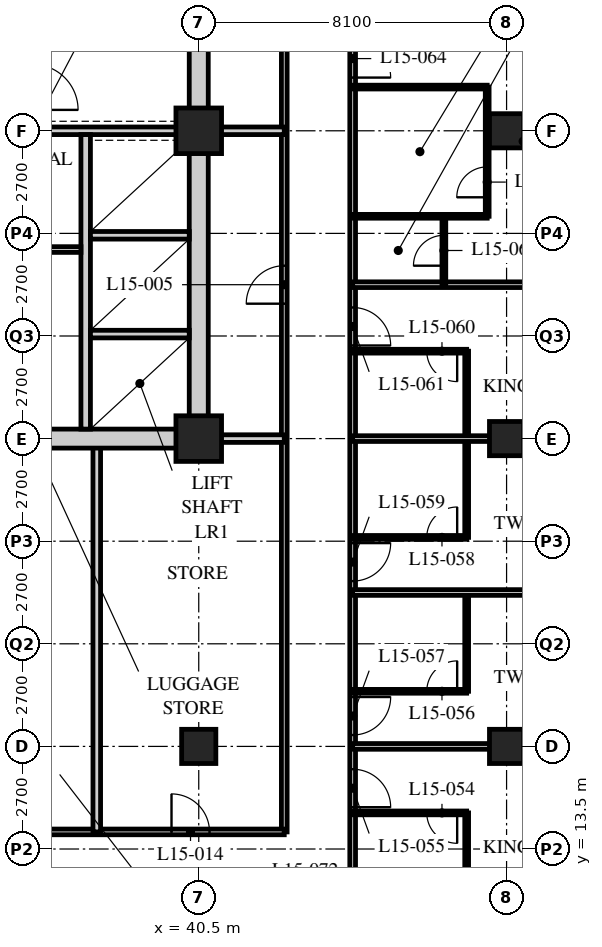
"""IFC4 building model, lengths in metres.
Left out: names, types, materials, properties, quantities, classifications, styles, units other than length and angle.
Written with IfcOpenShell. Run it as: python <this file> out.ifc"""

import sys

from ifc_helpers import new_model, si_unit, direction, frame, frame_2d, origin, origin_2d, place, context, subcontext, project, spatial, rectangle, hollow_rectangle, extrude, element, fill, save


model = new_model("IFC4")
c1 = context("Model", 3, precision=1e-05, world=origin(), true_north=direction((0.0, 1.0)))
c2 = subcontext(c1, "Body", "Model", "MODEL_VIEW")
j1 = project(units=[si_unit("LENGTHUNIT", "METRE"), si_unit("PLANEANGLEUNIT", "RADIAN")], contexts=[c1])
p1 = place(None, origin())
s1 = spatial("IfcSite", under=j1, at=p1, CompositionType="ELEMENT")
p2 = place(p1, origin())
s2 = spatial("IfcBuilding", under=s1, at=p2, CompositionType="ELEMENT")
p3 = place(p2, frame((0.0, 0.0, 63.6)))
s3 = spatial("IfcBuildingStorey", under=s2, at=p3, CompositionType="ELEMENT", Elevation=63.6)
p4 = place(p3, frame((40.5, 16.2, 0.0), z_axis=(0.0, 0.0, 1.0), x_axis=(1.0, 0.0, 0.0)))
e1 = element("IfcColumn", 1, at=p4, inside=s3, PredefinedType="COLUMN", context=c2, shape_type="SweptSolid", body=[
    extrude(hollow_rectangle(XDim=0.9, YDim=0.9, WallThickness=0.09, at=origin_2d()), origin(), (0.0, 0.0, 1.0), 3.4),
])
for number, where, z_axis, x_axis in (
    (2, (40.5, 24.3, 0.0), (0.0, 0.0, 1.0), (1.0, 0.0, 0.0)),
    (3, (40.5, 32.4, 0.0), (0.0, 0.0, 1.0), (1.0, 0.0, 0.0)),
):
    element("IfcColumn", number, at=place(p3, frame(where, z_axis=z_axis, x_axis=x_axis)), inside=s3, PredefinedType="COLUMN", context=c2, shape_type="SweptSolid", body=[
        extrude(hollow_rectangle(XDim=1.2, YDim=1.2, WallThickness=0.12, at=origin_2d()), origin(), (0.0, 0.0, 1.0), 3.4),
    ])
for number, where, z_axis, x_axis in (
    (4, (48.6, 16.2, 0.0), (0.0, 0.0, 1.0), (1.0, 0.0, 0.0)),
    (5, (48.6, 24.3, 0.0), (0.0, 0.0, 1.0), (1.0, 0.0, 0.0)),
    (6, (48.6, 32.4, 0.0), (0.0, 0.0, 1.0), (1.0, 0.0, 0.0)),
):
    element("IfcColumn", number, at=place(p3, frame(where, z_axis=z_axis, x_axis=x_axis)), inside=s3, PredefinedType="COLUMN", context=c2, shape_type="SweptSolid", body=[
        extrude(hollow_rectangle(XDim=0.9, YDim=0.9, WallThickness=0.09, at=origin_2d()), origin(), (0.0, 0.0, 1.0), 3.4),
    ])
p5 = place(p3, frame((44.55, 12.15, 0.0), z_axis=(0.0, 0.0, 1.0), x_axis=(0.0, 1.0, 0.0)))
e7 = element("IfcWall", 7, at=p5, inside=s3, PredefinedType="PARTITIONING", context=c2, shape_type="SweptSolid", body=[
    extrude(rectangle(XDim=30.15, YDim=0.15, at=frame_2d((15.075, 0.0))), origin(), (0.0, 0.0, 1.0), 3.19),
])
p6 = place(p5, frame((2.45, 0.0, 0.0)))
e8 = element("IfcOpeningElement", 8, at=p6, cuts=e7, PredefinedType="OPENING", context=c2, shape_type="SweptSolid", body=[
    extrude(rectangle(XDim=1.0, YDim=2.1, at=frame_2d((0.5, 1.05))), frame((0.0, 0.085, 0.0), z_axis=(0.0, -1.0, 0.0), x_axis=(1.0, 0.0, 0.0)), (0.0, 0.0, 1.0), 0.17),
])
p7 = place(p5, frame((4.35, 0.0, 0.0)))
e9 = element("IfcOpeningElement", 9, at=p7, cuts=e7, PredefinedType="OPENING", context=c2, shape_type="SweptSolid", body=[
    extrude(rectangle(XDim=1.0, YDim=2.1, at=frame_2d((0.5, 1.05))), frame((0.0, 0.085, 0.0), z_axis=(0.0, -1.0, 0.0), x_axis=(1.0, 0.0, 0.0)), (0.0, 0.0, 1.0), 0.17),
])
p8 = place(p5, frame((8.4, 0.0, 0.0)))
e10 = element("IfcOpeningElement", 10, at=p8, cuts=e7, PredefinedType="OPENING", context=c2, shape_type="SweptSolid", body=[
    extrude(rectangle(XDim=1.0, YDim=2.1, at=frame_2d((0.5, 1.05))), frame((0.0, 0.085, 0.0), z_axis=(0.0, -1.0, 0.0), x_axis=(1.0, 0.0, 0.0)), (0.0, 0.0, 1.0), 0.17),
])
p9 = place(p5, frame((14.6, 0.0, 0.0)))
e11 = element("IfcOpeningElement", 11, at=p9, cuts=e7, PredefinedType="OPENING", context=c2, shape_type="SweptSolid", body=[
    extrude(rectangle(XDim=1.0, YDim=2.1, at=frame_2d((0.5, 1.05))), frame((0.0, 0.085, 0.0), z_axis=(0.0, -1.0, 0.0), x_axis=(1.0, 0.0, 0.0)), (0.0, 0.0, 1.0), 0.17),
])
p10 = place(p5, frame((21.65, 0.0, 0.0)))
e12 = element("IfcOpeningElement", 12, at=p10, cuts=e7, PredefinedType="OPENING", context=c2, shape_type="SweptSolid", body=[
    extrude(rectangle(XDim=1.0, YDim=2.1, at=frame_2d((0.5, 1.05))), frame((0.0, 0.085, 0.0), z_axis=(0.0, -1.0, 0.0), x_axis=(1.0, 0.0, 0.0)), (0.0, 0.0, 1.0), 0.17),
])
p11 = place(p5, frame((26.7, 0.0, 0.0)))
e13 = element("IfcOpeningElement", 13, at=p11, cuts=e7, PredefinedType="OPENING", context=c2, shape_type="SweptSolid", body=[
    extrude(rectangle(XDim=1.0, YDim=2.1, at=frame_2d((0.5, 1.05))), frame((0.0, 0.085, 0.0), z_axis=(0.0, -1.0, 0.0), x_axis=(1.0, 0.0, 0.0)), (0.0, 0.0, 1.0), 0.17),
])
p12 = place(p3, frame((42.75, 13.95, 0.0), z_axis=(0.0, 0.0, 1.0), x_axis=(0.0, 1.0, 0.0)))
e14 = element("IfcWall", 14, at=p12, inside=s3, PredefinedType="PARTITIONING", context=c2, shape_type="SweptSolid", body=[
    extrude(rectangle(XDim=26.55, YDim=0.15, at=frame_2d((13.275, 0.0))), origin(), (0.0, 0.0, 1.0), 3.19),
])
p13 = place(p12, frame((13.9, 0.0, 0.0)))
e15 = element("IfcOpeningElement", 15, at=p13, cuts=e14, PredefinedType="OPENING", context=c2, shape_type="SweptSolid", body=[
    extrude(rectangle(XDim=1.0, YDim=2.1, at=frame_2d((0.5, 1.05))), frame((0.0, 0.085, 0.0), z_axis=(0.0, -1.0, 0.0), x_axis=(1.0, 0.0, 0.0)), (0.0, 0.0, 1.0), 0.17),
])
p14 = place(p12, frame((22.0, 0.0, 0.0)))
e16 = element("IfcOpeningElement", 16, at=p14, cuts=e14, PredefinedType="OPENING", context=c2, shape_type="SweptSolid", body=[
    extrude(rectangle(XDim=1.0, YDim=2.1, at=frame_2d((0.5, 1.05))), frame((0.0, 0.085, 0.0), z_axis=(0.0, -1.0, 0.0), x_axis=(1.0, 0.0, 0.0)), (0.0, 0.0, 1.0), 0.17),
])
p15 = place(p3, frame((29.56, 13.95, 0.0), z_axis=(0.0, 0.0, 1.0), x_axis=(1.0, 0.0, 0.0)))
e17 = element("IfcWall", 17, at=p15, inside=s3, PredefinedType="PARTITIONING", context=c2, shape_type="SweptSolid", body=[
    extrude(rectangle(XDim=13.19, YDim=0.15, at=frame_2d((6.595, 0.0))), origin(), (0.0, 0.0, 1.0), 3.19),
])
p16 = place(p15, frame((1.157, 0.0, 0.0)))
e18 = element("IfcOpeningElement", 18, at=p16, cuts=e17, PredefinedType="OPENING", context=c2, shape_type="SweptSolid", body=[
    extrude(rectangle(XDim=1.0, YDim=2.1, at=frame_2d((0.5, 1.05))), frame((0.0, 0.085, 0.0), z_axis=(0.0, -1.0, 0.0), x_axis=(1.0, 0.0, 0.0)), (0.0, 0.0, 1.0), 0.17),
])
p17 = place(p15, frame((5.29, 0.0, 0.0)))
e19 = element("IfcOpeningElement", 19, at=p17, cuts=e17, PredefinedType="OPENING", context=c2, shape_type="SweptSolid", body=[
    extrude(rectangle(XDim=1.0, YDim=2.1, at=frame_2d((0.5, 1.05))), frame((0.0, 0.085, 0.0), z_axis=(0.0, -1.0, 0.0), x_axis=(1.0, 0.0, 0.0)), (0.0, 0.0, 1.0), 0.17),
])
p18 = place(p15, frame((10.223, 0.0, 0.0)))
e20 = element("IfcOpeningElement", 20, at=p18, cuts=e17, PredefinedType="OPENING", context=c2, shape_type="SweptSolid", body=[
    extrude(rectangle(XDim=1.0, YDim=2.1, at=frame_2d((0.5, 1.05))), frame((0.0, 0.085, 0.0), z_axis=(0.0, -1.0, 0.0), x_axis=(1.0, 0.0, 0.0)), (0.0, 0.0, 1.0), 0.17),
])
p19 = place(p3, frame((40.5, 32.4, 0.0), z_axis=(0.0, 0.0, 1.0), x_axis=(1.0, 0.0, 0.0)))
e21 = element("IfcWall", 21, at=p19, inside=s3, PredefinedType="SOLIDWALL", context=c2, shape_type="SweptSolid", body=[
    extrude(rectangle(XDim=2.25, YDim=0.2, at=frame_2d((1.125, 0.0))), origin(), (0.0, 0.0, 1.0), 2.578),
])
p20 = place(p3, frame((37.817, 13.95, 0.0), z_axis=(0.0, 0.0, 1.0), x_axis=(0.0, 1.0, 0.0)))
e22 = element("IfcWall", 22, at=p20, inside=s3, PredefinedType="SOLIDWALL", context=c2, shape_type="SweptSolid", body=[
    extrude(rectangle(XDim=10.35, YDim=0.2, at=frame_2d((5.175, 0.0))), origin(), (0.0, 0.0, 1.0), 3.19),
])
p21 = place(p3, frame((40.5, 24.3, 0.0), z_axis=(0.0, 0.0, 1.0), x_axis=(1.0, 0.0, 0.0)))
e23 = element("IfcWall", 23, at=p21, inside=s3, PredefinedType="SOLIDWALL", context=c2, shape_type="SweptSolid", body=[
    extrude(rectangle(XDim=2.25, YDim=0.2, at=frame_2d((1.125, 0.0))), origin(), (0.0, 0.0, 1.0), 2.578),
])
p22 = place(p3, frame((47.55, 12.15, 0.0), z_axis=(0.0, 0.0, 1.0), x_axis=(0.0, 1.0, 0.0)))
e24 = element("IfcWall", 24, at=p22, inside=s3, PredefinedType="PARTITIONING", context=c2, shape_type="SweptSolid", body=[
    extrude(rectangle(XDim=2.3, YDim=0.1, at=frame_2d((1.15, 0.0))), origin(), (0.0, 0.0, 1.0), 3.19),
])
p23 = place(p3, frame((44.55, 14.45, 0.0), z_axis=(0.0, 0.0, 1.0), x_axis=(1.0, 0.0, 0.0)))
e25 = element("IfcWall", 25, at=p23, inside=s3, PredefinedType="PARTITIONING", context=c2, shape_type="SweptSolid", body=[
    extrude(rectangle(XDim=3.0, YDim=0.1, at=frame_2d((1.5, 0.0))), origin(), (0.0, 0.0, 1.0), 3.19),
])
p24 = place(p23, frame((1.95, 0.0, 0.0)))
e26 = element("IfcOpeningElement", 26, at=p24, cuts=e25, PredefinedType="OPENING", context=c2, shape_type="SweptSolid", body=[
    extrude(rectangle(XDim=0.8, YDim=2.1, at=frame_2d((0.4, 1.05))), frame((0.0, 0.06, 0.0), z_axis=(0.0, -1.0, 0.0), x_axis=(1.0, 0.0, 0.0)), (0.0, 0.0, 1.0), 0.12),
])
p25 = place(p3, frame((44.55, 16.2, 0.0), z_axis=(0.0, 0.0, 1.0), x_axis=(1.0, 0.0, 0.0)))
e27 = element("IfcWall", 27, at=p25, inside=s3, PredefinedType="PARTITIONING", context=c2, shape_type="SweptSolid", body=[
    extrude(rectangle(XDim=11.85, YDim=0.15, at=frame_2d((5.925, 0.0))), origin(), (0.0, 0.0, 1.0), 2.578),
])
p26 = place(p3, frame((47.55, 17.65, 0.0), z_axis=(0.0, 0.0, 1.0), x_axis=(0.0, 1.0, 0.0)))
e28 = element("IfcWall", 28, at=p26, inside=s3, PredefinedType="PARTITIONING", context=c2, shape_type="SweptSolid", body=[
    extrude(rectangle(XDim=2.6, YDim=0.1, at=frame_2d((1.3, 0.0))), origin(), (0.0, 0.0, 1.0), 3.19),
])
p27 = place(p3, frame((44.55, 17.65, 0.0), z_axis=(0.0, 0.0, 1.0), x_axis=(1.0, 0.0, 0.0)))
e29 = element("IfcWall", 29, at=p27, inside=s3, PredefinedType="PARTITIONING", context=c2, shape_type="SweptSolid", body=[
    extrude(rectangle(XDim=3.0, YDim=0.1, at=frame_2d((1.5, 0.0))), origin(), (0.0, 0.0, 1.0), 3.19),
])
p28 = place(p27, frame((1.95, 0.0, 0.0)))
e30 = element("IfcOpeningElement", 30, at=p28, cuts=e29, PredefinedType="OPENING", context=c2, shape_type="SweptSolid", body=[
    extrude(rectangle(XDim=0.8, YDim=2.1, at=frame_2d((0.4, 1.05))), frame((0.0, 0.06, 0.0), z_axis=(0.0, -1.0, 0.0), x_axis=(1.0, 0.0, 0.0)), (0.0, 0.0, 1.0), 0.12),
])
p29 = place(p3, frame((44.55, 20.25, 0.0), z_axis=(0.0, 0.0, 1.0), x_axis=(1.0, 0.0, 0.0)))
e31 = element("IfcWall", 31, at=p29, inside=s3, PredefinedType="PARTITIONING", context=c2, shape_type="SweptSolid", body=[
    extrude(rectangle(XDim=11.85, YDim=0.15, at=frame_2d((5.925, 0.0))), origin(), (0.0, 0.0, 1.0), 3.19),
])
p30 = place(p3, frame((47.55, 21.7, 0.0), z_axis=(0.0, 0.0, 1.0), x_axis=(0.0, 1.0, 0.0)))
e32 = element("IfcWall", 32, at=p30, inside=s3, PredefinedType="PARTITIONING", context=c2, shape_type="SweptSolid", body=[
    extrude(rectangle(XDim=4.9, YDim=0.1, at=frame_2d((2.45, 0.0))), origin(), (0.0, 0.0, 1.0), 3.19),
])
p31 = place(p3, frame((44.55, 21.7, 0.0), z_axis=(0.0, 0.0, 1.0), x_axis=(1.0, 0.0, 0.0)))
e33 = element("IfcWall", 33, at=p31, inside=s3, PredefinedType="PARTITIONING", context=c2, shape_type="SweptSolid", body=[
    extrude(rectangle(XDim=3.0, YDim=0.1, at=frame_2d((1.5, 0.0))), origin(), (0.0, 0.0, 1.0), 3.19),
])
p32 = place(p31, frame((1.95, 0.0, 0.0)))
e34 = element("IfcOpeningElement", 34, at=p32, cuts=e33, PredefinedType="OPENING", context=c2, shape_type="SweptSolid", body=[
    extrude(rectangle(XDim=0.8, YDim=2.1, at=frame_2d((0.4, 1.05))), frame((0.0, 0.06, 0.0), z_axis=(0.0, -1.0, 0.0), x_axis=(1.0, 0.0, 0.0)), (0.0, 0.0, 1.0), 0.12),
])
p33 = place(p3, frame((44.55, 24.3, 0.0), z_axis=(0.0, 0.0, 1.0), x_axis=(1.0, 0.0, 0.0)))
e35 = element("IfcWall", 35, at=p33, inside=s3, PredefinedType="PARTITIONING", context=c2, shape_type="SweptSolid", body=[
    extrude(rectangle(XDim=11.85, YDim=0.15, at=frame_2d((5.925, 0.0))), origin(), (0.0, 0.0, 1.0), 2.578),
])
p34 = place(p3, frame((44.55, 26.6, 0.0), z_axis=(0.0, 0.0, 1.0), x_axis=(1.0, 0.0, 0.0)))
e36 = element("IfcWall", 36, at=p34, inside=s3, PredefinedType="PARTITIONING", context=c2, shape_type="SweptSolid", body=[
    extrude(rectangle(XDim=3.0, YDim=0.1, at=frame_2d((1.5, 0.0))), origin(), (0.0, 0.0, 1.0), 3.19),
])
p35 = place(p34, frame((1.95, 0.0, 0.0)))
e37 = element("IfcOpeningElement", 37, at=p35, cuts=e36, PredefinedType="OPENING", context=c2, shape_type="SweptSolid", body=[
    extrude(rectangle(XDim=0.8, YDim=2.1, at=frame_2d((0.4, 1.05))), frame((0.0, 0.06, 0.0), z_axis=(0.0, -1.0, 0.0), x_axis=(1.0, 0.0, 0.0)), (0.0, 0.0, 1.0), 0.12),
])
p36 = place(p3, frame((44.55, 28.35, 0.0), z_axis=(0.0, 0.0, 1.0), x_axis=(1.0, 0.0, 0.0)))
e38 = element("IfcWall", 38, at=p36, inside=s3, PredefinedType="PARTITIONING", context=c2, shape_type="SweptSolid", body=[
    extrude(rectangle(XDim=11.85, YDim=0.15, at=frame_2d((5.925, 0.0))), origin(), (0.0, 0.0, 1.0), 3.19),
])
p37 = place(p3, frame((48.09, 30.15, 0.0), z_axis=(0.0, 0.0, 1.0), x_axis=(0.0, 1.0, 0.0)))
e39 = element("IfcWall", 39, at=p37, inside=s3, PredefinedType="PARTITIONING", context=c2, shape_type="SweptSolid", body=[
    extrude(rectangle(XDim=3.4, YDim=0.1, at=frame_2d((1.7, 0.0))), origin(), (0.0, 0.0, 1.0), 3.19),
])
p38 = place(p37, frame((0.5, 0.0, 0.0)))
e40 = element("IfcOpeningElement", 40, at=p38, cuts=e39, PredefinedType="OPENING", context=c2, shape_type="SweptSolid", body=[
    extrude(rectangle(XDim=0.8, YDim=2.1, at=frame_2d((0.4, 1.05))), frame((0.0, 0.06, 0.0), z_axis=(0.0, -1.0, 0.0), x_axis=(1.0, 0.0, 0.0)), (0.0, 0.0, 1.0), 0.12),
])
p39 = place(p3, frame((46.95, 28.35, 0.0), z_axis=(0.0, 0.0, 1.0), x_axis=(0.0, 1.0, 0.0)))
e41 = element("IfcWall", 41, at=p39, inside=s3, PredefinedType="PARTITIONING", context=c2, shape_type="SweptSolid", body=[
    extrude(rectangle(XDim=1.8, YDim=0.1, at=frame_2d((0.9, 0.0))), origin(), (0.0, 0.0, 1.0), 3.19),
])
p40 = place(p39, frame((0.5, 0.0, 0.0)))
e42 = element("IfcOpeningElement", 42, at=p40, cuts=e41, PredefinedType="OPENING", context=c2, shape_type="SweptSolid", body=[
    extrude(rectangle(XDim=0.8, YDim=2.1, at=frame_2d((0.4, 1.05))), frame((0.0, 0.06, 0.0), z_axis=(0.0, -1.0, 0.0), x_axis=(1.0, 0.0, 0.0)), (0.0, 0.0, 1.0), 0.12),
])
for number, where, z_axis, x_axis in (
    (43, (44.55, 30.15, 0.0), (0.0, 0.0, 1.0), (1.0, 0.0, 0.0)),
    (44, (44.55, 33.55, 0.0), (0.0, 0.0, 1.0), (1.0, 0.0, 0.0)),
):
    element("IfcWall", number, at=place(p3, frame(where, z_axis=z_axis, x_axis=x_axis)), inside=s3, PredefinedType="PARTITIONING", context=c2, shape_type="SweptSolid", body=[
        extrude(rectangle(XDim=3.54, YDim=0.1, at=frame_2d((1.77, 0.0))), origin(), (0.0, 0.0, 1.0), 3.19),
    ])
p41 = place(p3, frame((15.95, 24.3, 0.0), z_axis=(0.0, 0.0, 1.0), x_axis=(1.0, 0.0, 0.0)))
e45 = element("IfcWall", 45, at=p41, inside=s3, PredefinedType="SOLIDWALL", context=c2, shape_type="SweptSolid", body=[
    extrude(rectangle(XDim=24.8, YDim=0.5, at=frame_2d((12.4, 0.0))), origin(), (0.0, 0.0, 1.0), 2.54),
])
p42 = place(p41, frame((11.5, 0.0, 0.0)))
e46 = element("IfcOpeningElement", 46, at=p42, cuts=e45, PredefinedType="OPENING", context=c2, shape_type="SweptSolid", body=[
    extrude(rectangle(XDim=1.8, YDim=2.4, at=frame_2d((0.9, 1.2))), frame((0.0, 0.26, 0.0), z_axis=(0.0, -1.0, 0.0), x_axis=(1.0, 0.0, 0.0)), (0.0, 0.0, 1.0), 0.52),
])
p43 = place(p3, frame((40.5, 24.55, 0.0), z_axis=(0.0, 0.0, 1.0), x_axis=(0.0, 1.0, 0.0)))
e47 = element("IfcWall", 47, at=p43, inside=s3, PredefinedType="SOLIDWALL", context=c2, shape_type="SweptSolid", body=[
    extrude(rectangle(XDim=15.7, YDim=0.5, at=frame_2d((7.85, 0.0))), origin(), (0.0, 0.0, 1.0), 2.578),
])
p44 = place(p3, frame((32.3, 32.4, 0.0), z_axis=(0.0, 0.0, 1.0), x_axis=(1.0, 0.0, 0.0)))
e48 = element("IfcWall", 48, at=p44, inside=s3, PredefinedType="SOLIDWALL", context=c2, shape_type="SweptSolid", body=[
    extrude(rectangle(XDim=7.95, YDim=0.2, at=frame_2d((3.975, 0.0))), origin(), (0.0, 0.0, 1.0), 2.578),
])
p45 = place(p3, frame((37.525, 24.55, 0.0), z_axis=(0.0, 0.0, 1.0), x_axis=(0.0, 1.0, 0.0)))
e49 = element("IfcWall", 49, at=p45, inside=s3, PredefinedType="SOLIDWALL", context=c2, shape_type="SweptSolid", body=[
    extrude(rectangle(XDim=7.75, YDim=0.25, at=frame_2d((3.875, 0.0))), origin(), (0.0, 0.0, 1.0), 3.19),
])
for number, where, z_axis, x_axis in (
    (50, (37.65, 27.05, 0.0), (0.0, 0.0, 1.0), (1.0, 0.0, 0.0)),
    (51, (37.65, 29.65, 0.0), (0.0, 0.0, 1.0), (1.0, 0.0, 0.0)),
):
    element("IfcWall", number, at=place(p3, frame(where, z_axis=z_axis, x_axis=x_axis)), inside=s3, PredefinedType="SOLIDWALL", context=c2, shape_type="SweptSolid", body=[
        extrude(rectangle(XDim=2.6, YDim=0.2, at=frame_2d((1.3, 0.0))), origin(), (0.0, 0.0, 1.0), 3.19),
    ])
p46 = place(p3, frame((32.5, 29.275, 0.0), z_axis=(0.0, 0.0, 1.0), x_axis=(1.0, 0.0, 0.0)))
e52 = element("IfcWall", 52, at=p46, inside=s3, PredefinedType="PARTITIONING", context=c2, shape_type="SweptSolid", body=[
    extrude(rectangle(XDim=4.9, YDim=0.15, at=frame_2d((2.45, 0.0))), origin(), (0.0, 0.0, 1.0), 3.19),
])
p47 = place(p13, origin())
e53 = element("IfcDoor", 53, at=p47, inside=s3, OperationType="SINGLE_SWING_LEFT", PredefinedType="DOOR", context=c2, shape_type="SweptSolid", body=[
    extrude(rectangle(XDim=1.0, YDim=2.1, at=frame_2d((0.5, 1.05))), frame((0.0, 0.025, 0.0), z_axis=(0.0, -1.0, 0.0), x_axis=(1.0, 0.0, 0.0)), (0.0, 0.0, 1.0), 0.05),
])
fill(e15, e53)
p48 = place(p18, origin())
e54 = element("IfcDoor", 54, at=p48, inside=s3, OperationType="SINGLE_SWING_LEFT", PredefinedType="DOOR", context=c2, shape_type="SweptSolid", body=[
    extrude(rectangle(XDim=1.0, YDim=2.1, at=frame_2d((0.5, 1.05))), frame((0.0, 0.025, 0.0), z_axis=(0.0, -1.0, 0.0), x_axis=(1.0, 0.0, 0.0)), (0.0, 0.0, 1.0), 0.05),
])
fill(e20, e54)
p49 = place(p24, origin())
e55 = element("IfcDoor", 55, at=p49, inside=s3, OperationType="SINGLE_SWING_LEFT", PredefinedType="DOOR", context=c2, shape_type="SweptSolid", body=[
    extrude(rectangle(XDim=0.8, YDim=2.1, at=frame_2d((0.4, 1.05))), frame((0.0, 0.025, 0.0), z_axis=(0.0, -1.0, 0.0), x_axis=(1.0, 0.0, 0.0)), (0.0, 0.0, 1.0), 0.05),
])
fill(e26, e55)
p50 = place(p6, origin())
e56 = element("IfcDoor", 56, at=p50, inside=s3, OperationType="SINGLE_SWING_RIGHT", PredefinedType="DOOR", context=c2, shape_type="SweptSolid", body=[
    extrude(rectangle(XDim=1.0, YDim=2.1, at=frame_2d((0.5, 1.05))), frame((0.0, 0.025, 0.0), z_axis=(0.0, -1.0, 0.0), x_axis=(1.0, 0.0, 0.0)), (0.0, 0.0, 1.0), 0.05),
])
fill(e8, e56)
p51 = place(p28, origin())
e57 = element("IfcDoor", 57, at=p51, inside=s3, OperationType="SINGLE_SWING_RIGHT", PredefinedType="DOOR", context=c2, shape_type="SweptSolid", body=[
    extrude(rectangle(XDim=0.8, YDim=2.1, at=frame_2d((0.4, 1.05))), frame((0.0, 0.025, 0.0), z_axis=(0.0, -1.0, 0.0), x_axis=(1.0, 0.0, 0.0)), (0.0, 0.0, 1.0), 0.05),
])
fill(e30, e57)
p52 = place(p7, origin())
e58 = element("IfcDoor", 58, at=p52, inside=s3, OperationType="SINGLE_SWING_LEFT", PredefinedType="DOOR", context=c2, shape_type="SweptSolid", body=[
    extrude(rectangle(XDim=1.0, YDim=2.1, at=frame_2d((0.5, 1.05))), frame((0.0, 0.025, 0.0), z_axis=(0.0, -1.0, 0.0), x_axis=(1.0, 0.0, 0.0)), (0.0, 0.0, 1.0), 0.05),
])
fill(e9, e58)
p53 = place(p32, origin())
e59 = element("IfcDoor", 59, at=p53, inside=s3, OperationType="SINGLE_SWING_RIGHT", PredefinedType="DOOR", context=c2, shape_type="SweptSolid", body=[
    extrude(rectangle(XDim=0.8, YDim=2.1, at=frame_2d((0.4, 1.05))), frame((0.0, 0.025, 0.0), z_axis=(0.0, -1.0, 0.0), x_axis=(1.0, 0.0, 0.0)), (0.0, 0.0, 1.0), 0.05),
])
fill(e34, e59)
p54 = place(p8, origin())
e60 = element("IfcDoor", 60, at=p54, inside=s3, OperationType="SINGLE_SWING_LEFT", PredefinedType="DOOR", context=c2, shape_type="SweptSolid", body=[
    extrude(rectangle(XDim=1.0, YDim=2.1, at=frame_2d((0.5, 1.05))), frame((0.0, 0.025, 0.0), z_axis=(0.0, -1.0, 0.0), x_axis=(1.0, 0.0, 0.0)), (0.0, 0.0, 1.0), 0.05),
])
fill(e10, e60)
p55 = place(p35, origin())
e61 = element("IfcDoor", 61, at=p55, inside=s3, OperationType="SINGLE_SWING_LEFT", PredefinedType="DOOR", context=c2, shape_type="SweptSolid", body=[
    extrude(rectangle(XDim=0.8, YDim=2.1, at=frame_2d((0.4, 1.05))), frame((0.0, 0.025, 0.0), z_axis=(0.0, -1.0, 0.0), x_axis=(1.0, 0.0, 0.0)), (0.0, 0.0, 1.0), 0.05),
])
fill(e37, e61)
p56 = place(p9, origin())
e62 = element("IfcDoor", 62, at=p56, inside=s3, OperationType="SINGLE_SWING_RIGHT", PredefinedType="DOOR", context=c2, shape_type="SweptSolid", body=[
    extrude(rectangle(XDim=1.0, YDim=2.1, at=frame_2d((0.5, 1.05))), frame((0.0, 0.025, 0.0), z_axis=(0.0, -1.0, 0.0), x_axis=(1.0, 0.0, 0.0)), (0.0, 0.0, 1.0), 0.05),
])
fill(e11, e62)
p57 = place(p38, origin())
e63 = element("IfcDoor", 63, at=p57, inside=s3, OperationType="SINGLE_SWING_LEFT", PredefinedType="DOOR", context=c2, shape_type="SweptSolid", body=[
    extrude(rectangle(XDim=0.8, YDim=2.1, at=frame_2d((0.4, 1.05))), frame((0.0, 0.025, 0.0), z_axis=(0.0, -1.0, 0.0), x_axis=(1.0, 0.0, 0.0)), (0.0, 0.0, 1.0), 0.05),
])
fill(e40, e63)
p58 = place(p40, origin())
e64 = element("IfcDoor", 64, at=p58, inside=s3, OperationType="SINGLE_SWING_LEFT", PredefinedType="DOOR", context=c2, shape_type="SweptSolid", body=[
    extrude(rectangle(XDim=0.8, YDim=2.1, at=frame_2d((0.4, 1.05))), frame((0.0, 0.025, 0.0), z_axis=(0.0, -1.0, 0.0), x_axis=(1.0, 0.0, 0.0)), (0.0, 0.0, 1.0), 0.05),
])
fill(e42, e64)
p59 = place(p10, origin())
e65 = element("IfcDoor", 65, at=p59, inside=s3, OperationType="SINGLE_SWING_RIGHT", PredefinedType="DOOR", context=c2, shape_type="SweptSolid", body=[
    extrude(rectangle(XDim=1.0, YDim=2.1, at=frame_2d((0.5, 1.05))), frame((0.0, 0.025, 0.0), z_axis=(0.0, -1.0, 0.0), x_axis=(1.0, 0.0, 0.0)), (0.0, 0.0, 1.0), 0.05),
])
fill(e12, e65)
save(model, sys.argv[1])
